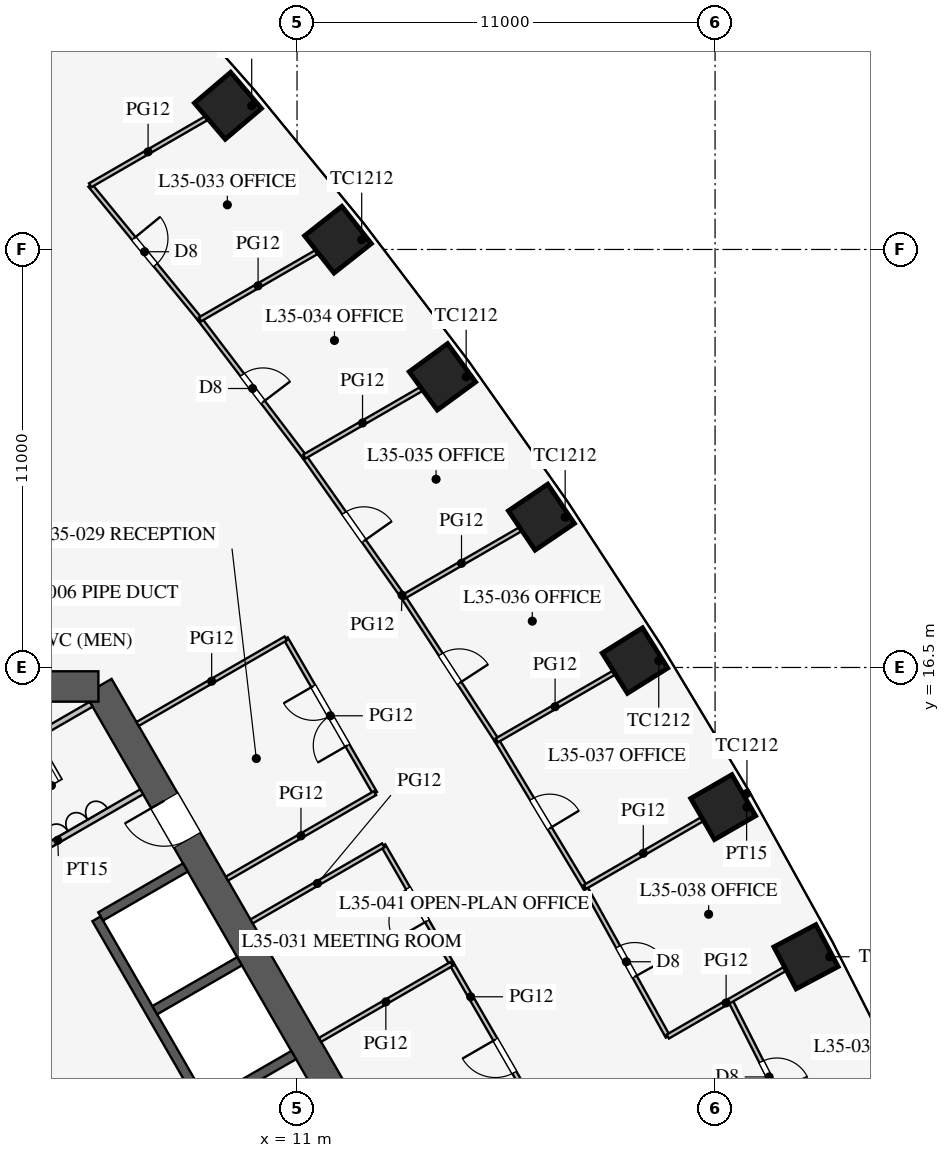
"""IFC4 building model, lengths in metres.
Left out: names, types, materials, properties, quantities, classifications, styles, units other than length and angle.
Written with IfcOpenShell. Run it as: python <this file> out.ifc"""

import sys

from ifc_helpers import new_model, si_unit, direction, frame, frame_2d, origin, origin_2d, place, context, subcontext, project, spatial, rectangle, extrude, element, fill, save


model = new_model("IFC4")
c1 = context("Model", 3, precision=1e-05, world=origin(), true_north=direction((0.0, 1.0)))
c2 = subcontext(c1, "Body", "Model", "MODEL_VIEW")
j1 = project(units=[si_unit("LENGTHUNIT", "METRE"), si_unit("PLANEANGLEUNIT", "RADIAN")], contexts=[c1])
p1 = place(None, origin())
s1 = spatial("IfcSite", under=j1, at=p1, CompositionType="ELEMENT")
p2 = place(p1, origin())
s2 = spatial("IfcBuilding", under=s1, at=p2, CompositionType="ELEMENT")
p3 = place(p2, frame((0.0, 0.0, 153.5)))
s3 = spatial("IfcBuildingStorey", under=s2, at=p3, CompositionType="ELEMENT", Elevation=153.5)
for number, where, z_axis, x_axis in (
    (1, (26.43, 4.867, 0.0), (0.0, 0.0, 1.0), (-0.436, 0.9, 0.0)),
    (2, (24.393, 8.887, 0.0), (0.0, 0.0, 1.0), (-0.468, 0.883, 0.0)),
    (3, (22.213, 12.825, 0.0), (0.0, 0.0, 1.0), (-0.5, 0.866, 0.0)),
    (4, (19.893, 16.681, 0.0), (0.0, 0.0, 1.0), (-0.531, 0.847, 0.0)),
    (5, (17.43, 20.456, 0.0), (0.0, 0.0, 1.0), (-0.561, 0.828, 0.0)),
    (6, (14.825, 24.148, 0.0), (0.0, 0.0, 1.0), (-0.591, 0.807, 0.0)),
    (7, (12.077, 27.757, 0.0), (0.0, 0.0, 1.0), (-0.62, 0.785, 0.0)),
    (8, (9.182, 31.282, 0.0), (0.0, 0.0, 1.0), (-0.648, 0.762, 0.0)),
):
    element("IfcColumn", number, at=place(p3, frame(where, z_axis=z_axis, x_axis=x_axis)), inside=s3, PredefinedType="COLUMN", context=c2, shape_type="SweptSolid", body=[
        extrude(rectangle(XDim=1.25, YDim=1.25, at=origin_2d()), origin(), (0.0, 0.0, 1.0), 4.2),
    ])
p4 = place(p3, frame((16.743, -3.0, 0.0), z_axis=(0.0, 0.0, 1.0), x_axis=(-0.500002442456, 0.866023993627, 0.0)))
e9 = element("IfcWall", 9, at=p4, inside=s3, PredefinedType="SHEAR", context=c2, shape_type="SweptSolid", body=[
    extrude(rectangle(XDim=21.939, YDim=0.8, at=frame_2d((10.97, 0.0))), origin(), (0.0, 0.0, 1.0), 4.2),
])
p5 = place(p4, frame((17.27, 0.0, 0.0)))
e10 = element("IfcOpeningElement", 10, at=p5, cuts=e9, PredefinedType="OPENING", context=c2, shape_type="SweptSolid", body=[
    extrude(rectangle(XDim=1.2, YDim=2.1, at=frame_2d((0.6, 1.05))), frame((0.0, 0.41, 0.0), z_axis=(0.0, -1.0, 0.0), x_axis=(1.0, 0.0, 0.0)), (0.0, 0.0, 1.0), 0.82),
])
p6 = place(p4, frame((3.47, 0.0, 0.0)))
e11 = element("IfcOpeningElement", 11, at=p6, cuts=e9, PredefinedType="OPENING", context=c2, shape_type="SweptSolid", body=[
    extrude(rectangle(XDim=1.2, YDim=2.1, at=frame_2d((0.6, 1.05))), frame((0.0, 0.41, 0.0), z_axis=(0.0, -1.0, 0.0), x_axis=(1.0, 0.0, 0.0)), (0.0, 0.0, 1.0), 0.82),
])
p7 = place(p3, frame((5.773, 16.0, 0.0), z_axis=(0.0, 0.0, 1.0), x_axis=(-1.0, 0.0, 0.0)))
e12 = element("IfcWall", 12, at=p7, inside=s3, PredefinedType="SHEAR", context=c2, shape_type="SweptSolid", body=[
    extrude(rectangle(XDim=11.547, YDim=0.8, at=frame_2d((5.773, 0.0))), origin(), (0.0, 0.0, 1.0), 4.2),
])
p8 = place(p3, frame((11.424, 0.014, 0.0), z_axis=(0.0, 0.0, 1.0), x_axis=(-0.500001763848, 0.866024385424, 0.0)))
e13 = element("IfcWall", 13, at=p8, inside=s3, PredefinedType="SHEAR", context=c2, shape_type="SweptSolid", body=[
    extrude(rectangle(XDim=11.4, YDim=0.25, at=frame_2d((5.7, 0.0))), origin(), (0.0, 0.0, 1.0), 4.2),
])
p9 = place(p8, frame((0.975, 0.0, 0.0)))
e14 = element("IfcOpeningElement", 14, at=p9, cuts=e13, PredefinedType="OPENING", context=c2, shape_type="SweptSolid", body=[
    extrude(rectangle(XDim=0.9, YDim=2.1, at=frame_2d((0.45, 1.05))), frame((0.0, 0.135, 0.0), z_axis=(0.0, -1.0, 0.0), x_axis=(1.0, 0.0, 0.0)), (0.0, 0.0, 1.0), 0.27),
])
p10 = place(p8, frame((3.825, 0.0, 0.0)))
e15 = element("IfcOpeningElement", 15, at=p10, cuts=e13, PredefinedType="OPENING", context=c2, shape_type="SweptSolid", body=[
    extrude(rectangle(XDim=0.9, YDim=2.1, at=frame_2d((0.45, 1.05))), frame((0.0, 0.135, 0.0), z_axis=(0.0, -1.0, 0.0), x_axis=(1.0, 0.0, 0.0)), (0.0, 0.0, 1.0), 0.27),
])
for number, where, z_axis, x_axis in (
    (16, (8.682, 5.012, 0.0), (0.0, 0.0, 1.0), (0.866, 0.5, 0.0)),
    (17, (7.257, 7.481, 0.0), (0.0, 0.0, 1.0), (0.866, 0.5, 0.0)),
):
    element("IfcWall", number, at=place(p3, frame(where, z_axis=z_axis, x_axis=x_axis)), inside=s3, PredefinedType="SHEAR", context=c2, shape_type="SweptSolid", body=[
        extrude(rectangle(XDim=2.575, YDim=0.25, at=frame_2d((1.288, 0.0))), origin(), (0.0, 0.0, 1.0), 4.2),
    ])
p11 = place(p3, frame((5.832, 9.949, 0.0), z_axis=(0.0, 0.0, 1.0), x_axis=(0.866029291668, 0.499993265928, 0.0)))
e18 = element("IfcWall", 18, at=p11, inside=s3, PredefinedType="SHEAR", context=c2, shape_type="SweptSolid", body=[
    extrude(rectangle(XDim=2.575, YDim=0.25, at=frame_2d((1.288, 0.0))), origin(), (0.0, 0.0, 1.0), 4.2),
])
p12 = place(p3, frame((2.495, 10.678, 0.0), z_axis=(0.0, 0.0, 1.0), x_axis=(0.86602216432, 0.500005610874, 0.0)))
e19 = element("IfcWall", 19, at=p12, inside=s3, PredefinedType="PARTITIONING", context=c2, shape_type="SweptSolid", body=[
    extrude(rectangle(XDim=5.1, YDim=0.15, at=frame_2d((2.55, 0.0))), origin(), (0.0, 0.0, 1.0), 4.0),
])
p13 = place(p12, frame((1.3, 0.0, 0.0)))
e20 = element("IfcOpeningElement", 20, at=p13, cuts=e19, PredefinedType="OPENING", context=c2, shape_type="SweptSolid", body=[
    extrude(rectangle(XDim=0.9, YDim=2.1, at=frame_2d((0.45, 1.05))), frame((0.0, 0.085, 0.0), z_axis=(0.0, -1.0, 0.0), x_axis=(1.0, 0.0, 0.0)), (0.0, 0.0, 1.0), 0.17),
])
p14 = place(p3, frame((2.031, 13.482, 0.0), z_axis=(0.0, 0.0, 1.0), x_axis=(0.866050731258, 0.499956128963, 0.0)))
e21 = element("IfcWall", 21, at=p14, inside=s3, PredefinedType="PARTITIONING", context=c2, shape_type="SweptSolid", body=[
    extrude(rectangle(XDim=4.1, YDim=0.15, at=frame_2d((2.05, 0.0))), origin(), (0.0, 0.0, 1.0), 4.0),
])
p15 = place(p3, frame((13.052, 13.194, 0.0), z_axis=(0.0, 0.0, 1.0), x_axis=(-0.499977259774, 0.866038532462, 0.0)))
e22 = element("IfcWall", 22, at=p15, inside=s3, PredefinedType="PARTITIONING", context=c2, shape_type="SweptSolid", body=[
    extrude(rectangle(XDim=4.7, YDim=0.12, at=frame_2d((2.35, 0.0))), origin(), (0.0, 0.0, 1.0), 2.9),
])
p16 = place(p15, frame((1.45, 0.0, 0.15)))
e23 = element("IfcOpeningElement", 23, at=p16, cuts=e22, PredefinedType="OPENING", context=c2, shape_type="SweptSolid", body=[
    extrude(rectangle(XDim=1.8, YDim=2.1, at=frame_2d((0.9, 1.05))), frame((0.0, 0.07, 0.0), z_axis=(0.0, -1.0, 0.0), x_axis=(1.0, 0.0, 0.0)), (0.0, 0.0, 1.0), 0.14),
])
p17 = place(p3, frame((15.069, 8.7, 0.0), z_axis=(0.0, 0.0, 1.0), x_axis=(-0.500012057535, 0.866018442252, 0.0)))
e24 = element("IfcWall", 24, at=p17, inside=s3, PredefinedType="PARTITIONING", context=c2, shape_type="SweptSolid", body=[
    extrude(rectangle(XDim=3.6, YDim=0.12, at=frame_2d((1.8, 0.0))), origin(), (0.0, 0.0, 1.0), 2.9),
])
p18 = place(p17, frame((1.3, 0.0, 0.15)))
e25 = element("IfcOpeningElement", 25, at=p18, cuts=e24, PredefinedType="OPENING", context=c2, shape_type="SweptSolid", body=[
    extrude(rectangle(XDim=1.0, YDim=2.1, at=frame_2d((0.5, 1.05))), frame((0.0, 0.07, 0.0), z_axis=(0.0, -1.0, 0.0), x_axis=(1.0, 0.0, 0.0)), (0.0, 0.0, 1.0), 0.14),
])
p19 = place(p3, frame((17.869, 3.85, 0.0), z_axis=(0.0, 0.0, 1.0), x_axis=(-0.500016814911, 0.866015695474, 0.0)))
e26 = element("IfcWall", 26, at=p19, inside=s3, PredefinedType="PARTITIONING", context=c2, shape_type="SweptSolid", body=[
    extrude(rectangle(XDim=5.6, YDim=0.12, at=frame_2d((2.8, 0.0))), origin(), (0.0, 0.0, 1.0), 2.9),
])
p20 = place(p19, frame((2.3, 0.0, 0.15)))
e27 = element("IfcOpeningElement", 27, at=p20, cuts=e26, PredefinedType="OPENING", context=c2, shape_type="SweptSolid", body=[
    extrude(rectangle(XDim=1.0, YDim=2.1, at=frame_2d((0.5, 1.05))), frame((0.0, 0.07, 0.0), z_axis=(0.0, -1.0, 0.0), x_axis=(1.0, 0.0, 0.0)), (0.0, 0.0, 1.0), 0.14),
])
p21 = place(p3, frame((9.805, 9.818, 0.0), z_axis=(0.0, 0.0, 1.0), x_axis=(0.866026010844, 0.49999894854, 0.0)))
e28 = element("IfcWall", 28, at=p21, inside=s3, PredefinedType="PARTITIONING", context=c2, shape_type="SweptSolid", body=[
    extrude(rectangle(XDim=4.0, YDim=0.12, at=frame_2d((2.0, 0.0))), origin(), (0.0, 0.0, 1.0), 2.9),
])
p22 = place(p3, frame((9.155, 10.944, 0.0), z_axis=(0.0, 0.0, 1.0), x_axis=(0.866017533419, 0.500013631625, 0.0)))
e29 = element("IfcWall", 29, at=p22, inside=s3, PredefinedType="PARTITIONING", context=c2, shape_type="SweptSolid", body=[
    extrude(rectangle(XDim=4.5, YDim=0.12, at=frame_2d((2.25, 0.0))), origin(), (0.0, 0.0, 1.0), 2.9),
])
p23 = place(p3, frame((6.805, 15.014, 0.0), z_axis=(0.0, 0.0, 1.0), x_axis=(0.866031096941, 0.499990139034, 0.0)))
e30 = element("IfcWall", 30, at=p23, inside=s3, PredefinedType="PARTITIONING", context=c2, shape_type="SweptSolid", body=[
    extrude(rectangle(XDim=4.5, YDim=0.12, at=frame_2d((2.25, 0.0))), origin(), (0.0, 0.0, 1.0), 2.9),
])
p24 = place(p3, frame((11.605, 6.7, 0.0), z_axis=(0.0, 0.0, 1.0), x_axis=(0.866026010844, 0.49999894854, 0.0)))
e31 = element("IfcWall", 31, at=p24, inside=s3, PredefinedType="PARTITIONING", context=c2, shape_type="SweptSolid", body=[
    extrude(rectangle(XDim=4.0, YDim=0.12, at=frame_2d((2.0, 0.0))), origin(), (0.0, 0.0, 1.0), 2.8),
])
p25 = place(p3, frame((22.758, 13.139, 0.0), z_axis=(0.0, 0.0, 1.0), x_axis=(0.866063163075, 0.499934593286, 0.0)))
e32 = element("IfcWall", 32, at=p25, inside=s3, PredefinedType="PARTITIONING", context=c2, shape_type="SweptSolid", body=[
    extrude(rectangle(XDim=0.166, YDim=0.15, at=frame_2d((0.083, 0.0))), origin(), (0.0, 0.0, 1.0), 2.9),
])
p26 = place(p3, frame((18.576, 10.725, 0.0), z_axis=(0.0, 0.0, 1.0), x_axis=(-0.515548366618, 0.856860479703, 0.0)))
e33 = element("IfcWall", 33, at=p26, inside=s3, PredefinedType="PARTITIONING", context=c2, shape_type="SweptSolid", body=[
    extrude(rectangle(XDim=4.501, YDim=0.12, at=frame_2d((2.25, 0.0))), origin(), (0.0, 0.0, 1.0), 2.9),
])
p27 = place(p26, frame((1.8, 0.0, 0.15)))
e34 = element("IfcOpeningElement", 34, at=p27, cuts=e33, PredefinedType="OPENING", context=c2, shape_type="SweptSolid", body=[
    extrude(rectangle(XDim=0.9, YDim=2.1, at=frame_2d((0.45, 1.05))), frame((0.0, 0.07, 0.0), z_axis=(0.0, -1.0, 0.0), x_axis=(1.0, 0.0, 0.0)), (0.0, 0.0, 1.0), 0.14),
])
p28 = place(p3, frame((11.192, 22.05, 0.0), z_axis=(0.0, 0.0, 1.0), x_axis=(-0.605274299339, 0.796016973789, 0.0)))
e35 = element("IfcWall", 35, at=p28, inside=s3, PredefinedType="PARTITIONING", context=c2, shape_type="SweptSolid", body=[
    extrude(rectangle(XDim=4.536, YDim=0.12, at=frame_2d((2.268, 0.0))), origin(), (0.0, 0.0, 1.0), 2.9),
])
p29 = place(p28, frame((1.8, 0.0, 0.15)))
e36 = element("IfcOpeningElement", 36, at=p29, cuts=e35, PredefinedType="OPENING", context=c2, shape_type="SweptSolid", body=[
    extrude(rectangle(XDim=0.9, YDim=2.1, at=frame_2d((0.45, 1.05))), frame((0.0, 0.07, 0.0), z_axis=(0.0, -1.0, 0.0), x_axis=(1.0, 0.0, 0.0)), (0.0, 0.0, 1.0), 0.14),
])
p30 = place(p3, frame((8.447, 25.661, 0.0), z_axis=(0.0, 0.0, 1.0), x_axis=(-0.633843962561, 0.773460943503, 0.0)))
e37 = element("IfcWall", 37, at=p30, inside=s3, PredefinedType="PARTITIONING", context=c2, shape_type="SweptSolid", body=[
    extrude(rectangle(XDim=4.561, YDim=0.12, at=frame_2d((2.28, 0.0))), origin(), (0.0, 0.0, 1.0), 2.9),
])
p31 = place(p30, frame((1.85, 0.0, 0.15)))
e38 = element("IfcOpeningElement", 38, at=p31, cuts=e37, PredefinedType="OPENING", context=c2, shape_type="SweptSolid", body=[
    extrude(rectangle(XDim=0.9, YDim=2.1, at=frame_2d((0.45, 1.05))), frame((0.0, 0.07, 0.0), z_axis=(0.0, -1.0, 0.0), x_axis=(1.0, 0.0, 0.0)), (0.0, 0.0, 1.0), 0.14),
])
p32 = place(p3, frame((16.256, 14.581, 0.0), z_axis=(0.0, 0.0, 1.0), x_axis=(-0.546069464151, 0.837739900161, 0.0)))
e39 = element("IfcWall", 39, at=p32, inside=s3, PredefinedType="PARTITIONING", context=c2, shape_type="SweptSolid", body=[
    extrude(rectangle(XDim=4.507, YDim=0.12, at=frame_2d((2.253, 0.0))), origin(), (0.0, 0.0, 1.0), 2.9),
])
p33 = place(p32, frame((1.8, 0.0, 0.15)))
e40 = element("IfcOpeningElement", 40, at=p33, cuts=e39, PredefinedType="OPENING", context=c2, shape_type="SweptSolid", body=[
    extrude(rectangle(XDim=0.9, YDim=2.1, at=frame_2d((0.45, 1.05))), frame((0.0, 0.07, 0.0), z_axis=(0.0, -1.0, 0.0), x_axis=(1.0, 0.0, 0.0)), (0.0, 0.0, 1.0), 0.14),
])
p34 = place(p3, frame((13.795, 18.357, 0.0), z_axis=(0.0, 0.0, 1.0), x_axis=(-0.575987178736, 0.817458726745, 0.0)))
e41 = element("IfcWall", 41, at=p34, inside=s3, PredefinedType="PARTITIONING", context=c2, shape_type="SweptSolid", body=[
    extrude(rectangle(XDim=4.518, YDim=0.12, at=frame_2d((2.259, 0.0))), origin(), (0.0, 0.0, 1.0), 2.9),
])
p35 = place(p34, frame((1.8, 0.0, 0.15)))
e42 = element("IfcOpeningElement", 42, at=p35, cuts=e41, PredefinedType="OPENING", context=c2, shape_type="SweptSolid", body=[
    extrude(rectangle(XDim=0.9, YDim=2.1, at=frame_2d((0.45, 1.05))), frame((0.0, 0.07, 0.0), z_axis=(0.0, -1.0, 0.0), x_axis=(1.0, 0.0, 0.0)), (0.0, 0.0, 1.0), 0.14),
])
p36 = place(p3, frame((20.756, 6.787, 0.0), z_axis=(0.0, 0.0, 1.0), x_axis=(-0.484292898211, 0.874905931368, 0.0)))
e43 = element("IfcWall", 43, at=p36, inside=s3, PredefinedType="PARTITIONING", context=c2, shape_type="SweptSolid", body=[
    extrude(rectangle(XDim=4.501, YDim=0.12, at=frame_2d((2.25, 0.0))), origin(), (0.0, 0.0, 1.0), 2.9),
])
p37 = place(p36, frame((1.8, 0.0, 0.15)))
e44 = element("IfcOpeningElement", 44, at=p37, cuts=e43, PredefinedType="OPENING", context=c2, shape_type="SweptSolid", body=[
    extrude(rectangle(XDim=0.9, YDim=2.1, at=frame_2d((0.45, 1.05))), frame((0.0, 0.07, 0.0), z_axis=(0.0, -1.0, 0.0), x_axis=(1.0, 0.0, 0.0)), (0.0, 0.0, 1.0), 0.14),
])
p38 = place(p3, frame((24.44, 3.718, 0.0), z_axis=(0.0, 0.0, 1.0), x_axis=(-0.452471679136, 0.891778772779, 0.0)))
e45 = element("IfcWall", 45, at=p38, inside=s3, PredefinedType="PARTITIONING", context=c2, shape_type="SweptSolid", body=[
    extrude(rectangle(XDim=4.507, YDim=0.12, at=frame_2d((2.253, 0.0))), origin(), (0.0, 0.0, 1.0), 2.9),
])
p39 = place(p38, frame((1.8, 0.0, 0.15)))
e46 = element("IfcOpeningElement", 46, at=p39, cuts=e45, PredefinedType="OPENING", context=c2, shape_type="SweptSolid", body=[
    extrude(rectangle(XDim=0.9, YDim=2.1, at=frame_2d((0.45, 1.05))), frame((0.0, 0.07, 0.0), z_axis=(0.0, -1.0, 0.0), x_axis=(1.0, 0.0, 0.0)), (0.0, 0.0, 1.0), 0.14),
])
p40 = place(p3, frame((18.576, 10.725, 0.0), z_axis=(0.0, 0.0, 1.0), x_axis=(0.866030760678, 0.499990721473, 0.0)))
e47 = element("IfcWall", 47, at=p40, inside=s3, PredefinedType="PARTITIONING", context=c2, shape_type="SweptSolid", body=[
    extrude(rectangle(XDim=3.545, YDim=0.12, at=frame_2d((1.772, 0.0))), origin(), (0.0, 0.0, 1.0), 2.8),
])
p41 = place(p3, frame((11.192, 22.05, 0.0), z_axis=(0.0, 0.0, 1.0), x_axis=(0.86605108476, 0.499955516607, 0.0)))
e48 = element("IfcWall", 48, at=p41, inside=s3, PredefinedType="PARTITIONING", context=c2, shape_type="SweptSolid", body=[
    extrude(rectangle(XDim=3.536, YDim=0.12, at=frame_2d((1.768, 0.0))), origin(), (0.0, 0.0, 1.0), 2.6),
])
p42 = place(p3, frame((8.447, 25.661, 0.0), z_axis=(0.0, 0.0, 1.0), x_axis=(0.866025485263, 0.499999858875, 0.0)))
e49 = element("IfcWall", 49, at=p42, inside=s3, PredefinedType="PARTITIONING", context=c2, shape_type="SweptSolid", body=[
    extrude(rectangle(XDim=3.53, YDim=0.12, at=frame_2d((1.765, 0.0))), origin(), (0.0, 0.0, 1.0), 2.8),
])
p43 = place(p3, frame((5.556, 29.188, 0.0), z_axis=(0.0, 0.0, 1.0), x_axis=(0.866028552163, 0.499994546809, 0.0)))
e50 = element("IfcWall", 50, at=p43, inside=s3, PredefinedType="PARTITIONING", context=c2, shape_type="SweptSolid", body=[
    extrude(rectangle(XDim=3.521, YDim=0.12, at=frame_2d((1.76, 0.0))), origin(), (0.0, 0.0, 1.0), 2.9),
])
p44 = place(p3, frame((16.256, 14.581, 0.0), z_axis=(0.0, 0.0, 1.0), x_axis=(0.866008926066, 0.500028539159, 0.0)))
e51 = element("IfcWall", 51, at=p44, inside=s3, PredefinedType="PARTITIONING", context=c2, shape_type="SweptSolid", body=[
    extrude(rectangle(XDim=3.544, YDim=0.12, at=frame_2d((1.772, 0.0))), origin(), (0.0, 0.0, 1.0), 2.8),
])
p45 = place(p3, frame((13.795, 18.357, 0.0), z_axis=(0.0, 0.0, 1.0), x_axis=(0.866045526189, 0.499965145353, 0.0)))
e52 = element("IfcWall", 52, at=p45, inside=s3, PredefinedType="PARTITIONING", context=c2, shape_type="SweptSolid", body=[
    extrude(rectangle(XDim=3.541, YDim=0.12, at=frame_2d((1.771, 0.0))), origin(), (0.0, 0.0, 1.0), 2.9),
])
p46 = place(p3, frame((20.756, 6.787, 0.0), z_axis=(0.0, 0.0, 1.0), x_axis=(0.866038754309, 0.499976875499, 0.0)))
e53 = element("IfcWall", 53, at=p46, inside=s3, PredefinedType="PARTITIONING", context=c2, shape_type="SweptSolid", body=[
    extrude(rectangle(XDim=3.544, YDim=0.12, at=frame_2d((1.772, 0.0))), origin(), (0.0, 0.0, 1.0), 2.8),
])
p47 = place(p5, origin())
e54 = element("IfcDoor", 54, at=p47, inside=s3, OperationType="SINGLE_SWING_RIGHT", PredefinedType="DOOR", context=c2, shape_type="SweptSolid", body=[
    extrude(rectangle(XDim=1.2, YDim=2.1, at=frame_2d((0.6, 1.05))), frame((0.0, 0.025, 0.0), z_axis=(0.0, -1.0, 0.0), x_axis=(1.0, 0.0, 0.0)), (0.0, 0.0, 1.0), 0.05),
])
fill(e10, e54)
p48 = place(p16, origin())
e55 = element("IfcDoor", 55, at=p48, inside=s3, OperationType="DOUBLE_DOOR_SINGLE_SWING", PredefinedType="DOOR", context=c2, shape_type="SweptSolid", body=[
    extrude(rectangle(XDim=1.8, YDim=2.1, at=frame_2d((0.9, 1.05))), frame((0.0, 0.025, 0.0), z_axis=(0.0, -1.0, 0.0), x_axis=(1.0, 0.0, 0.0)), (0.0, 0.0, 1.0), 0.05),
])
fill(e23, e55)
p49 = place(p20, origin())
e56 = element("IfcDoor", 56, at=p49, inside=s3, OperationType="SINGLE_SWING_RIGHT", PredefinedType="DOOR", context=c2, shape_type="SweptSolid", body=[
    extrude(rectangle(XDim=1.0, YDim=2.1, at=frame_2d((0.5, 1.05))), frame((0.0, 0.025, 0.0), z_axis=(0.0, -1.0, 0.0), x_axis=(1.0, 0.0, 0.0)), (0.0, 0.0, 1.0), 0.05),
])
fill(e27, e56)
p50 = place(p18, origin())
e57 = element("IfcDoor", 57, at=p50, inside=s3, OperationType="SINGLE_SWING_LEFT", PredefinedType="DOOR", context=c2, shape_type="SweptSolid", body=[
    extrude(rectangle(XDim=1.0, YDim=2.1, at=frame_2d((0.5, 1.05))), frame((0.0, 0.025, 0.0), z_axis=(0.0, -1.0, 0.0), x_axis=(1.0, 0.0, 0.0)), (0.0, 0.0, 1.0), 0.05),
])
fill(e25, e57)
p51 = place(p31, frame((0.9, 0.0, 0.0), z_axis=(0.0, 0.0, 1.0), x_axis=(-1.0, 0.0, 0.0)))
e58 = element("IfcDoor", 58, at=p51, inside=s3, OperationType="SINGLE_SWING_LEFT", PredefinedType="DOOR", context=c2, shape_type="SweptSolid", body=[
    extrude(rectangle(XDim=0.9, YDim=2.1, at=frame_2d((0.45, 1.05))), frame((0.0, 0.025, 0.0), z_axis=(0.0, -1.0, 0.0), x_axis=(1.0, 0.0, 0.0)), (0.0, 0.0, 1.0), 0.05),
])
fill(e38, e58)
p52 = place(p29, frame((0.9, 0.0, 0.0), z_axis=(0.0, 0.0, 1.0), x_axis=(-1.0, 0.0, 0.0)))
e59 = element("IfcDoor", 59, at=p52, inside=s3, OperationType="SINGLE_SWING_RIGHT", PredefinedType="DOOR", context=c2, shape_type="SweptSolid", body=[
    extrude(rectangle(XDim=0.9, YDim=2.1, at=frame_2d((0.45, 1.05))), frame((0.0, 0.025, 0.0), z_axis=(0.0, -1.0, 0.0), x_axis=(1.0, 0.0, 0.0)), (0.0, 0.0, 1.0), 0.05),
])
fill(e36, e59)
p53 = place(p35, frame((0.9, 0.0, 0.0), z_axis=(0.0, 0.0, 1.0), x_axis=(-1.0, 0.0, 0.0)))
e60 = element("IfcDoor", 60, at=p53, inside=s3, OperationType="SINGLE_SWING_RIGHT", PredefinedType="DOOR", context=c2, shape_type="SweptSolid", body=[
    extrude(rectangle(XDim=0.9, YDim=2.1, at=frame_2d((0.45, 1.05))), frame((0.0, 0.025, 0.0), z_axis=(0.0, -1.0, 0.0), x_axis=(1.0, 0.0, 0.0)), (0.0, 0.0, 1.0), 0.05),
])
fill(e42, e60)
p54 = place(p33, frame((0.9, 0.0, 0.0), z_axis=(0.0, 0.0, 1.0), x_axis=(-1.0, 0.0, 0.0)))
e61 = element("IfcDoor", 61, at=p54, inside=s3, OperationType="SINGLE_SWING_RIGHT", PredefinedType="DOOR", context=c2, shape_type="SweptSolid", body=[
    extrude(rectangle(XDim=0.9, YDim=2.1, at=frame_2d((0.45, 1.05))), frame((0.0, 0.025, 0.0), z_axis=(0.0, -1.0, 0.0), x_axis=(1.0, 0.0, 0.0)), (0.0, 0.0, 1.0), 0.05),
])
fill(e40, e61)
p55 = place(p27, frame((0.9, 0.0, 0.0), z_axis=(0.0, 0.0, 1.0), x_axis=(-1.0, 0.0, 0.0)))
e62 = element("IfcDoor", 62, at=p55, inside=s3, OperationType="SINGLE_SWING_RIGHT", PredefinedType="DOOR", context=c2, shape_type="SweptSolid", body=[
    extrude(rectangle(XDim=0.9, YDim=2.1, at=frame_2d((0.45, 1.05))), frame((0.0, 0.025, 0.0), z_axis=(0.0, -1.0, 0.0), x_axis=(1.0, 0.0, 0.0)), (0.0, 0.0, 1.0), 0.05),
])
fill(e34, e62)
p56 = place(p37, frame((0.9, 0.0, 0.0), z_axis=(0.0, 0.0, 1.0), x_axis=(-1.0, 0.0, 0.0)))
e63 = element("IfcDoor", 63, at=p56, inside=s3, OperationType="SINGLE_SWING_RIGHT", PredefinedType="DOOR", context=c2, shape_type="SweptSolid", body=[
    extrude(rectangle(XDim=0.9, YDim=2.1, at=frame_2d((0.45, 1.05))), frame((0.0, 0.025, 0.0), z_axis=(0.0, -1.0, 0.0), x_axis=(1.0, 0.0, 0.0)), (0.0, 0.0, 1.0), 0.05),
])
fill(e44, e63)
p57 = place(p39, frame((0.9, 0.0, 0.0), z_axis=(0.0, 0.0, 1.0), x_axis=(-1.0, 0.0, 0.0)))
e64 = element("IfcDoor", 64, at=p57, inside=s3, OperationType="SINGLE_SWING_RIGHT", PredefinedType="DOOR", context=c2, shape_type="SweptSolid", body=[
    extrude(rectangle(XDim=0.9, YDim=2.1, at=frame_2d((0.45, 1.05))), frame((0.0, 0.025, 0.0), z_axis=(0.0, -1.0, 0.0), x_axis=(1.0, 0.0, 0.0)), (0.0, 0.0, 1.0), 0.05),
])
fill(e46, e64)
save(model, sys.argv[1])
